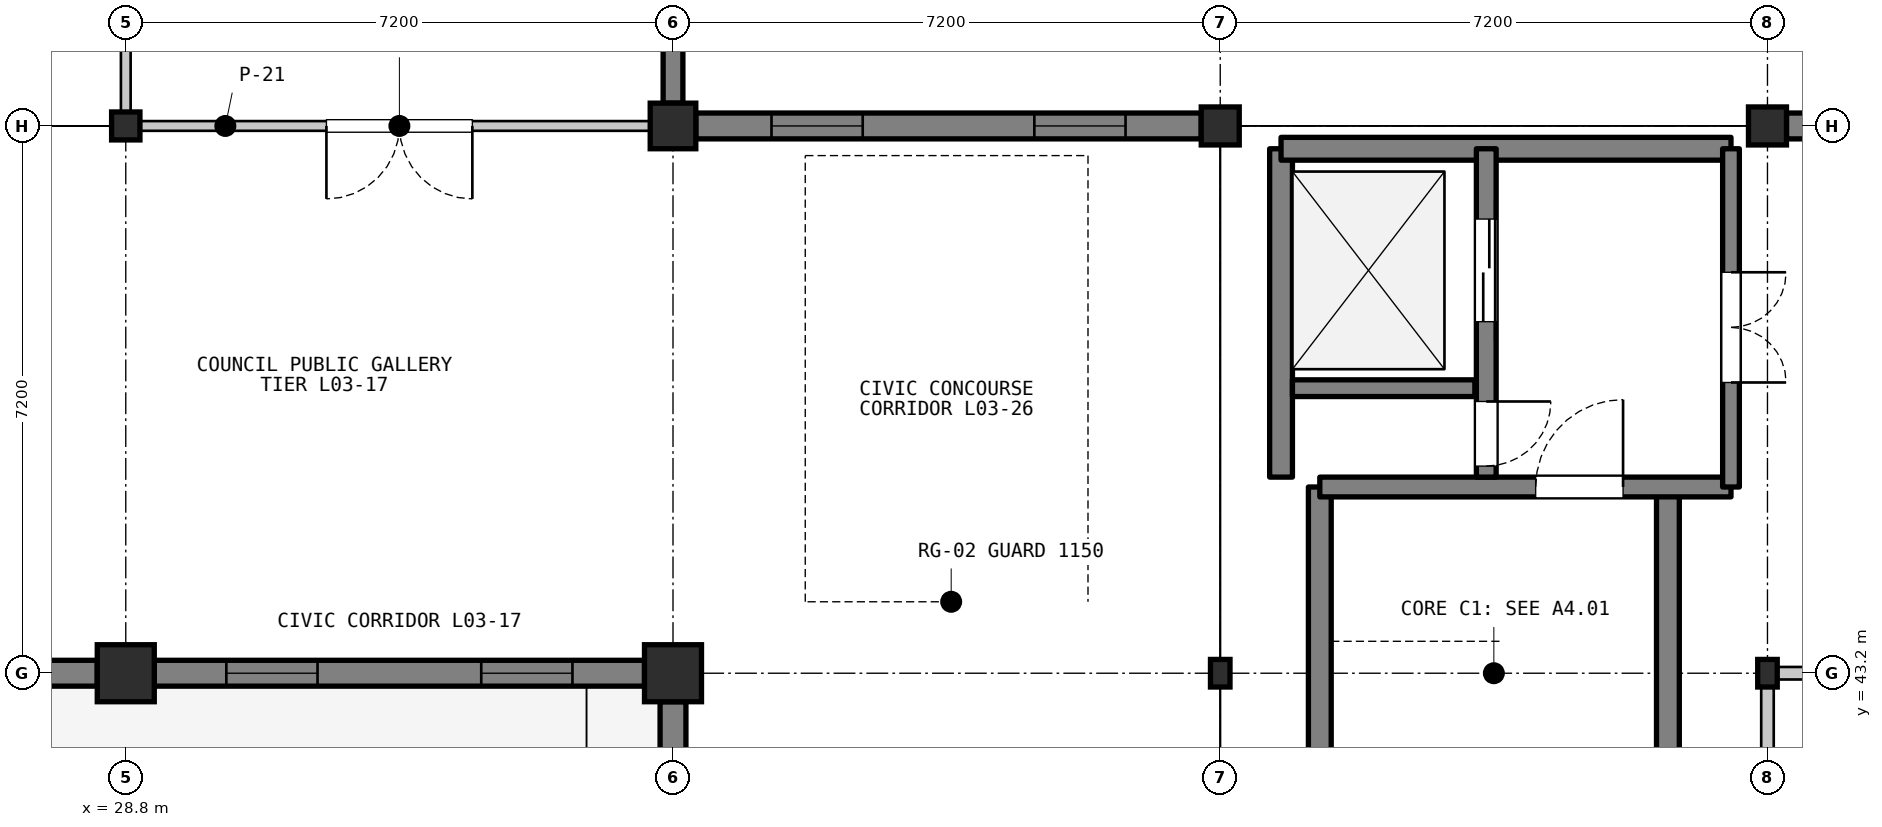
"""IFC4 building model, lengths in metres.
Left out: names, types, materials, properties, quantities, classifications, styles, units other than length and angle.
Written with IfcOpenShell. Run it as: python <this file> out.ifc"""

import sys

from ifc_helpers import new_model, si_unit, direction, frame, frame_2d, origin, origin_2d, place, context, subcontext, project, spatial, rectangle, i_section, extrude, element, fill, save


model = new_model("IFC4")
c1 = context("Model", 3, precision=1e-05, world=origin(), true_north=direction((0.0, 1.0)))
c2 = subcontext(c1, "Body", "Model", "MODEL_VIEW")
j1 = project(units=[si_unit("LENGTHUNIT", "METRE"), si_unit("PLANEANGLEUNIT", "RADIAN")], contexts=[c1])
p1 = place(None, origin())
s1 = spatial("IfcSite", under=j1, at=p1, CompositionType="ELEMENT")
p2 = place(p1, origin())
s2 = spatial("IfcBuilding", under=s1, at=p2, CompositionType="ELEMENT")
p3 = place(p2, frame((0.0, 0.0, 9.9)))
s3 = spatial("IfcBuildingStorey", under=s2, at=p3, CompositionType="ELEMENT", Elevation=9.9)
p4 = place(p3, frame((28.8, 43.2, 0.0), z_axis=(0.0, 0.0, 1.0), x_axis=(1.0, 0.0, 0.0)))
e1 = element("IfcColumn", 1, at=p4, inside=s3, PredefinedType="COLUMN", context=c2, shape_type="SweptSolid", body=[
    extrude(rectangle(XDim=0.75, YDim=0.75, at=origin_2d()), origin(), (0.0, 0.0, 1.0), 4.2),
])
p5 = place(p3, frame((28.8, 50.4, 0.0), z_axis=(0.0, 0.0, 1.0), x_axis=(1.0, 0.0, 0.0)))
e2 = element("IfcColumn", 2, at=p5, inside=s3, PredefinedType="COLUMN", context=c2, shape_type="SweptSolid", body=[
    extrude(i_section(OverallWidth=0.373, OverallDepth=0.368, WebThickness=0.015, FlangeThickness=0.024, FilletRadius=0.015, at=origin_2d()), origin(), (0.0, 0.0, 1.0), 4.2),
])
p6 = place(p3, frame((36.0, 43.2, 0.0), z_axis=(0.0, 0.0, 1.0), x_axis=(1.0, 0.0, 0.0)))
e3 = element("IfcColumn", 3, at=p6, inside=s3, PredefinedType="COLUMN", context=c2, shape_type="SweptSolid", body=[
    extrude(rectangle(XDim=0.75, YDim=0.75, at=origin_2d()), origin(), (0.0, 0.0, 1.0), 4.2),
])
p7 = place(p3, frame((36.0, 50.4, 0.0), z_axis=(0.0, 0.0, 1.0), x_axis=(1.0, 0.0, 0.0)))
e4 = element("IfcColumn", 4, at=p7, inside=s3, PredefinedType="COLUMN", context=c2, shape_type="SweptSolid", body=[
    extrude(rectangle(XDim=0.6, YDim=0.6, at=origin_2d()), origin(), (0.0, 0.0, 1.0), 4.2),
])
p8 = place(p3, frame((43.2, 43.2, 0.0), z_axis=(0.0, 0.0, 1.0), x_axis=(1.0, 0.0, 0.0)))
e5 = element("IfcColumn", 5, at=p8, inside=s3, PredefinedType="COLUMN", context=c2, shape_type="SweptSolid", body=[
    extrude(i_section(OverallWidth=0.257, OverallDepth=0.363, WebThickness=0.013, FlangeThickness=0.022, FilletRadius=0.015, at=origin_2d()), origin(), (0.0, 0.0, 1.0), 4.2),
])
p9 = place(p3, frame((43.2, 50.4, 0.0), z_axis=(0.0, 0.0, 1.0), x_axis=(1.0, 0.0, 0.0)))
e6 = element("IfcColumn", 6, at=p9, inside=s3, PredefinedType="COLUMN", context=c2, shape_type="SweptSolid", body=[
    extrude(rectangle(XDim=0.5, YDim=0.5, at=origin_2d()), origin(), (0.0, 0.0, 1.0), 4.2),
])
p10 = place(p3, frame((50.4, 43.2, 0.0), z_axis=(0.0, 0.0, 1.0), x_axis=(1.0, 0.0, 0.0)))
e7 = element("IfcColumn", 7, at=p10, inside=s3, PredefinedType="COLUMN", context=c2, shape_type="SweptSolid", body=[
    extrude(i_section(OverallWidth=0.257, OverallDepth=0.363, WebThickness=0.013, FlangeThickness=0.022, FilletRadius=0.015, at=origin_2d()), origin(), (0.0, 0.0, 1.0), 4.2),
])
p11 = place(p3, frame((50.4, 50.4, 0.0), z_axis=(0.0, 0.0, 1.0), x_axis=(1.0, 0.0, 0.0)))
e8 = element("IfcColumn", 8, at=p11, inside=s3, PredefinedType="COLUMN", context=c2, shape_type="SweptSolid", body=[
    extrude(rectangle(XDim=0.5, YDim=0.5, at=origin_2d()), origin(), (0.0, 0.0, 1.0), 4.2),
])
p12 = place(p3, frame((28.425, 43.2, 0.0), z_axis=(0.0, 0.0, 1.0), x_axis=(-1.0, 0.0, 0.0)))
e9 = element("IfcWall", 9, at=p12, inside=s3, PredefinedType="SOLIDWALL", context=c2, shape_type="SweptSolid", body=[
    extrude(rectangle(XDim=6.45, YDim=0.34, at=frame_2d((3.225, 0.0))), origin(), (0.0, 0.0, 1.0), 3.398),
])
p13 = place(p12, frame((0.948, 0.0, 0.95)))
e10 = element("IfcOpeningElement", 10, at=p13, cuts=e9, PredefinedType="OPENING", context=c2, shape_type="SweptSolid", body=[
    extrude(rectangle(XDim=1.2, YDim=1.7, at=frame_2d((0.6, 0.85))), frame((0.0, 0.18, 0.0), z_axis=(0.0, -1.0, 0.0), x_axis=(1.0, 0.0, 0.0)), (0.0, 0.0, 1.0), 0.36),
])
p14 = place(p12, frame((4.302, 0.0, 0.95)))
e11 = element("IfcOpeningElement", 11, at=p14, cuts=e9, PredefinedType="OPENING", context=c2, shape_type="SweptSolid", body=[
    extrude(rectangle(XDim=1.2, YDim=1.7, at=frame_2d((0.6, 0.85))), frame((0.0, 0.18, 0.0), z_axis=(0.0, -1.0, 0.0), x_axis=(1.0, 0.0, 0.0)), (0.0, 0.0, 1.0), 0.36),
])
p15 = place(p3, frame((35.625, 43.2, 0.0), z_axis=(0.0, 0.0, 1.0), x_axis=(-1.0, 0.0, 0.0)))
e12 = element("IfcWall", 12, at=p15, inside=s3, PredefinedType="SOLIDWALL", context=c2, shape_type="SweptSolid", body=[
    extrude(rectangle(XDim=6.45, YDim=0.34, at=frame_2d((3.225, 0.0))), origin(), (0.0, 0.0, 1.0), 3.398),
])
p16 = place(p15, frame((0.948, 0.0, 0.95)))
e13 = element("IfcOpeningElement", 13, at=p16, cuts=e12, PredefinedType="OPENING", context=c2, shape_type="SweptSolid", body=[
    extrude(rectangle(XDim=1.2, YDim=1.7, at=frame_2d((0.6, 0.85))), frame((0.0, 0.18, 0.0), z_axis=(0.0, -1.0, 0.0), x_axis=(1.0, 0.0, 0.0)), (0.0, 0.0, 1.0), 0.36),
])
p17 = place(p15, frame((4.302, 0.0, 0.95)))
e14 = element("IfcOpeningElement", 14, at=p17, cuts=e12, PredefinedType="OPENING", context=c2, shape_type="SweptSolid", body=[
    extrude(rectangle(XDim=1.2, YDim=1.7, at=frame_2d((0.6, 0.85))), frame((0.0, 0.18, 0.0), z_axis=(0.0, -1.0, 0.0), x_axis=(1.0, 0.0, 0.0)), (0.0, 0.0, 1.0), 0.36),
])
p18 = place(p3, frame((36.0, 57.3, 0.0), z_axis=(0.0, 0.0, 1.0), x_axis=(0.0, -1.0, 0.0)))
e15 = element("IfcWall", 15, at=p18, inside=s3, PredefinedType="SOLIDWALL", context=c2, shape_type="SweptSolid", body=[
    extrude(rectangle(XDim=6.6, YDim=0.26, at=frame_2d((3.3, 0.0))), origin(), (0.0, 0.0, 1.0), 3.487),
])
p19 = place(p18, frame((1.95, 0.0, 0.95)))
e16 = element("IfcOpeningElement", 16, at=p19, cuts=e15, PredefinedType="OPENING", context=c2, shape_type="SweptSolid", body=[
    extrude(rectangle(XDim=2.7, YDim=1.8, at=frame_2d((1.35, 0.9))), frame((0.0, 0.14, 0.0), z_axis=(0.0, -1.0, 0.0), x_axis=(1.0, 0.0, 0.0)), (0.0, 0.0, 1.0), 0.28),
])
p20 = place(p3, frame((36.0, 36.375, 0.0), z_axis=(0.0, 0.0, 1.0), x_axis=(0.0, 1.0, 0.0)))
e17 = element("IfcWall", 17, at=p20, inside=s3, PredefinedType="SOLIDWALL", context=c2, shape_type="SweptSolid", body=[
    extrude(rectangle(XDim=6.45, YDim=0.34, at=frame_2d((3.225, 0.0))), origin(), (0.0, 0.0, 1.0), 3.35),
])
p21 = place(p20, frame((0.948, 0.0, 0.95)))
e18 = element("IfcOpeningElement", 18, at=p21, cuts=e17, PredefinedType="OPENING", context=c2, shape_type="SweptSolid", body=[
    extrude(rectangle(XDim=1.2, YDim=1.7, at=frame_2d((0.6, 0.85))), frame((0.0, 0.18, 0.0), z_axis=(0.0, -1.0, 0.0), x_axis=(1.0, 0.0, 0.0)), (0.0, 0.0, 1.0), 0.36),
])
p22 = place(p20, frame((4.302, 0.0, 0.95)))
e19 = element("IfcOpeningElement", 19, at=p22, cuts=e17, PredefinedType="OPENING", context=c2, shape_type="SweptSolid", body=[
    extrude(rectangle(XDim=1.2, YDim=1.7, at=frame_2d((0.6, 0.85))), frame((0.0, 0.18, 0.0), z_axis=(0.0, -1.0, 0.0), x_axis=(1.0, 0.0, 0.0)), (0.0, 0.0, 1.0), 0.36),
])
p23 = place(p3, frame((36.3, 50.4, 0.0), z_axis=(0.0, 0.0, 1.0), x_axis=(1.0, 0.0, 0.0)))
e20 = element("IfcWall", 20, at=p23, inside=s3, PredefinedType="SOLIDWALL", context=c2, shape_type="SweptSolid", body=[
    extrude(rectangle(XDim=6.65, YDim=0.34, at=frame_2d((3.325, 0.0))), origin(), (0.0, 0.0, 1.0), 3.398),
])
p24 = place(p23, frame((0.996, 0.0, 0.95)))
e21 = element("IfcOpeningElement", 21, at=p24, cuts=e20, PredefinedType="OPENING", context=c2, shape_type="SweptSolid", body=[
    extrude(rectangle(XDim=1.2, YDim=1.7, at=frame_2d((0.6, 0.85))), frame((0.0, 0.18, 0.0), z_axis=(0.0, -1.0, 0.0), x_axis=(1.0, 0.0, 0.0)), (0.0, 0.0, 1.0), 0.36),
])
p25 = place(p23, frame((4.454, 0.0, 0.95)))
e22 = element("IfcOpeningElement", 22, at=p25, cuts=e20, PredefinedType="OPENING", context=c2, shape_type="SweptSolid", body=[
    extrude(rectangle(XDim=1.2, YDim=1.7, at=frame_2d((0.6, 0.85))), frame((0.0, 0.18, 0.0), z_axis=(0.0, -1.0, 0.0), x_axis=(1.0, 0.0, 0.0)), (0.0, 0.0, 1.0), 0.36),
])
p26 = place(p3, frame((50.65, 50.4, 0.0), z_axis=(0.0, 0.0, 1.0), x_axis=(1.0, 0.0, 0.0)))
e23 = element("IfcWall", 23, at=p26, inside=s3, PredefinedType="SOLIDWALL", context=c2, shape_type="SweptSolid", body=[
    extrude(rectangle(XDim=6.7, YDim=0.34, at=frame_2d((3.35, 0.0))), origin(), (0.0, 0.0, 1.0), 3.398),
])
p27 = place(p26, frame((1.008, 0.0, 0.95)))
e24 = element("IfcOpeningElement", 24, at=p27, cuts=e23, PredefinedType="OPENING", context=c2, shape_type="SweptSolid", body=[
    extrude(rectangle(XDim=1.2, YDim=1.7, at=frame_2d((0.6, 0.85))), frame((0.0, 0.18, 0.0), z_axis=(0.0, -1.0, 0.0), x_axis=(1.0, 0.0, 0.0)), (0.0, 0.0, 1.0), 0.36),
])
p28 = place(p26, frame((4.492, 0.0, 0.95)))
e25 = element("IfcOpeningElement", 25, at=p28, cuts=e23, PredefinedType="OPENING", context=c2, shape_type="SweptSolid", body=[
    extrude(rectangle(XDim=1.2, YDim=1.7, at=frame_2d((0.6, 0.85))), frame((0.0, 0.18, 0.0), z_axis=(0.0, -1.0, 0.0), x_axis=(1.0, 0.0, 0.0)), (0.0, 0.0, 1.0), 0.36),
])
for number, where, z_axis, x_axis in (
    (26, (44.51, 36.35, 0.0), (0.0, 0.0, 1.0), (0.0, 1.0, 0.0)),
    (27, (49.09, 36.35, 0.0), (0.0, 0.0, 1.0), (0.0, 1.0, 0.0)),
):
    element("IfcWall", number, at=place(p3, frame(where, z_axis=z_axis, x_axis=x_axis)), inside=s3, PredefinedType="SHEAR", context=c2, shape_type="SweptSolid", body=[
        extrude(rectangle(XDim=9.3, YDim=0.3, at=frame_2d((4.65, 0.0))), origin(), (0.0, 0.0, 1.0), 4.02),
    ])
p29 = place(p3, frame((44.51, 45.65, 0.0), z_axis=(0.0, 0.0, 1.0), x_axis=(1.0, 0.0, 0.0)))
e28 = element("IfcWall", 28, at=p29, inside=s3, PredefinedType="SHEAR", context=c2, shape_type="SweptSolid", body=[
    extrude(rectangle(XDim=5.41, YDim=0.26, at=frame_2d((2.705, 0.0))), origin(), (0.0, 0.0, 1.0), 4.02),
])
p30 = place(p29, frame((2.84, 0.0, 0.0)))
e29 = element("IfcOpeningElement", 29, at=p30, cuts=e28, PredefinedType="OPENING", context=c2, shape_type="SweptSolid", body=[
    extrude(rectangle(XDim=1.15, YDim=2.15, at=frame_2d((0.575, 1.075))), frame((0.0, 0.14, 0.0), z_axis=(0.0, -1.0, 0.0), x_axis=(1.0, 0.0, 0.0)), (0.0, 0.0, 1.0), 0.28),
])
p31 = place(p3, frame((44.0, 45.78, 0.0), z_axis=(0.0, 0.0, 1.0), x_axis=(0.0, 1.0, 0.0)))
e30 = element("IfcWall", 30, at=p31, inside=s3, PredefinedType="SHEAR", context=c2, shape_type="SweptSolid", body=[
    extrude(rectangle(XDim=4.32, YDim=0.3, at=frame_2d((2.16, 0.0))), origin(), (0.0, 0.0, 1.0), 4.02),
])
p32 = place(p3, frame((44.0, 50.1, 0.0), z_axis=(0.0, 0.0, 1.0), x_axis=(1.0, 0.0, 0.0)))
e31 = element("IfcWall", 31, at=p32, inside=s3, PredefinedType="SHEAR", context=c2, shape_type="SweptSolid", body=[
    extrude(rectangle(XDim=5.92, YDim=0.3, at=frame_2d((2.96, 0.0))), origin(), (0.0, 0.0, 1.0), 4.02),
])
p33 = place(p3, frame((44.15, 46.95, 0.0), z_axis=(0.0, 0.0, 1.0), x_axis=(1.0, 0.0, 0.0)))
e32 = element("IfcWall", 32, at=p33, inside=s3, PredefinedType="SHEAR", context=c2, shape_type="SweptSolid", body=[
    extrude(rectangle(XDim=2.4, YDim=0.22, at=frame_2d((1.2, 0.0))), origin(), (0.0, 0.0, 1.0), 4.02),
])
p34 = place(p3, frame((46.7, 50.1, 0.0), z_axis=(0.0, 0.0, 1.0), x_axis=(0.0, -1.0, 0.0)))
e33 = element("IfcWall", 33, at=p34, inside=s3, PredefinedType="SHEAR", context=c2, shape_type="SweptSolid", body=[
    extrude(rectangle(XDim=4.32, YDim=0.26, at=frame_2d((2.16, 0.0))), origin(), (0.0, 0.0, 1.0), 4.02),
])
p35 = place(p34, frame((0.925, 0.0, 0.0)))
e34 = element("IfcOpeningElement", 34, at=p35, cuts=e33, PredefinedType="OPENING", context=c2, shape_type="SweptSolid", body=[
    extrude(rectangle(XDim=1.35, YDim=2.2, at=frame_2d((0.675, 1.1))), frame((0.0, 0.14, 0.0), z_axis=(0.0, -1.0, 0.0), x_axis=(1.0, 0.0, 0.0)), (0.0, 0.0, 1.0), 0.28),
])
p36 = place(p34, frame((3.325, 0.0, 0.0)))
e35 = element("IfcOpeningElement", 35, at=p36, cuts=e33, PredefinedType="OPENING", context=c2, shape_type="SweptSolid", body=[
    extrude(rectangle(XDim=0.85, YDim=2.05, at=frame_2d((0.425, 1.025))), frame((0.0, 0.14, 0.0), z_axis=(0.0, -1.0, 0.0), x_axis=(1.0, 0.0, 0.0)), (0.0, 0.0, 1.0), 0.28),
])
p37 = place(p3, frame((49.92, 50.1, 0.0), z_axis=(0.0, 0.0, 1.0), x_axis=(0.0, -1.0, 0.0)))
e36 = element("IfcWall", 36, at=p37, inside=s3, PredefinedType="SHEAR", context=c2, shape_type="SweptSolid", body=[
    extrude(rectangle(XDim=4.45, YDim=0.22, at=frame_2d((2.225, 0.0))), origin(), (0.0, 0.0, 1.0), 4.02),
])
p38 = place(p37, frame((1.625, 0.0, 0.0)))
e37 = element("IfcOpeningElement", 37, at=p38, cuts=e36, PredefinedType="OPENING", context=c2, shape_type="SweptSolid", body=[
    extrude(rectangle(XDim=1.45, YDim=2.2, at=frame_2d((0.725, 1.1))), frame((0.0, 0.12, 0.0), z_axis=(0.0, -1.0, 0.0), x_axis=(1.0, 0.0, 0.0)), (0.0, 0.0, 1.0), 0.24),
])
p39 = place(p3, frame((35.88, 50.4, 0.0), z_axis=(0.0, 0.0, 1.0), x_axis=(-1.0, 0.0, 0.0)))
e38 = element("IfcWall", 38, at=p39, inside=s3, PredefinedType="PARTITIONING", context=c2, shape_type="SweptSolid", body=[
    extrude(rectangle(XDim=6.96, YDim=0.128, at=frame_2d((3.48, 0.0))), origin(), (0.0, 0.0, 1.0), 3.388),
])
p40 = place(p39, frame((2.52, 0.0, 0.0)))
e39 = element("IfcOpeningElement", 39, at=p40, cuts=e38, PredefinedType="OPENING", context=c2, shape_type="SweptSolid", body=[
    extrude(rectangle(XDim=1.92, YDim=2.38, at=frame_2d((0.96, 1.19))), frame((0.0, 0.074, 0.0), z_axis=(0.0, -1.0, 0.0), x_axis=(1.0, 0.0, 0.0)), (0.0, 0.0, 1.0), 0.148),
])
p41 = place(p3, frame((28.8, 50.52, 0.0), z_axis=(0.0, 0.0, 1.0), x_axis=(0.0, 1.0, 0.0)))
e40 = element("IfcWall", 40, at=p41, inside=s3, PredefinedType="PARTITIONING", context=c2, shape_type="SweptSolid", body=[
    extrude(rectangle(XDim=6.8, YDim=0.128, at=frame_2d((3.4, 0.0))), origin(), (0.0, 0.0, 1.0), 3.388),
])
p42 = place(p3, frame((50.52, 43.2, 0.0), z_axis=(0.0, 0.0, 1.0), x_axis=(1.0, 0.0, 0.0)))
e41 = element("IfcWall", 41, at=p42, inside=s3, PredefinedType="PARTITIONING", context=c2, shape_type="SweptSolid", body=[
    extrude(rectangle(XDim=6.8, YDim=0.165, at=frame_2d((3.4, 0.0))), origin(), (0.0, 0.0, 1.0), 3.388),
])
p43 = place(p42, frame((2.64, 0.0, 0.0)))
e42 = element("IfcOpeningElement", 42, at=p43, cuts=e41, PredefinedType="OPENING", context=c2, shape_type="SweptSolid", body=[
    extrude(rectangle(XDim=1.52, YDim=2.4, at=frame_2d((0.76, 1.2))), frame((0.0, 0.093, 0.0), z_axis=(0.0, -1.0, 0.0), x_axis=(1.0, 0.0, 0.0)), (0.0, 0.0, 1.0), 0.185),
])
p44 = place(p42, frame((0.45, 0.0, 1.05)))
e43 = element("IfcOpeningElement", 43, at=p44, cuts=e41, PredefinedType="OPENING", context=c2, shape_type="SweptSolid", body=[
    extrude(rectangle(XDim=1.55, YDim=1.15, at=frame_2d((0.775, 0.575))), frame((0.0, 0.093, 0.0), z_axis=(0.0, -1.0, 0.0), x_axis=(1.0, 0.0, 0.0)), (0.0, 0.0, 1.0), 0.185),
])
p45 = place(p3, frame((50.4, 36.12, 0.0), z_axis=(0.0, 0.0, 1.0), x_axis=(0.0, 1.0, 0.0)))
e44 = element("IfcWall", 44, at=p45, inside=s3, PredefinedType="PARTITIONING", context=c2, shape_type="SweptSolid", body=[
    extrude(rectangle(XDim=6.96, YDim=0.165, at=frame_2d((3.48, 0.0))), origin(), (0.0, 0.0, 1.0), 3.388),
])
p46 = place(p16, origin())
e45 = element("IfcWindow", 45, at=p46, inside=s3, PartitioningType="SINGLE_PANEL", PredefinedType="WINDOW", context=c2, shape_type="SweptSolid", body=[
    extrude(rectangle(XDim=1.2, YDim=1.7, at=frame_2d((0.6, 0.85))), frame((0.0, 0.03, 0.0), z_axis=(0.0, -1.0, 0.0), x_axis=(1.0, 0.0, 0.0)), (0.0, 0.0, 1.0), 0.06),
])
fill(e13, e45)
p47 = place(p17, origin())
e46 = element("IfcWindow", 46, at=p47, inside=s3, PartitioningType="SINGLE_PANEL", PredefinedType="WINDOW", context=c2, shape_type="SweptSolid", body=[
    extrude(rectangle(XDim=1.2, YDim=1.7, at=frame_2d((0.6, 0.85))), frame((0.0, 0.03, 0.0), z_axis=(0.0, -1.0, 0.0), x_axis=(1.0, 0.0, 0.0)), (0.0, 0.0, 1.0), 0.06),
])
fill(e14, e46)
p48 = place(p24, origin())
e47 = element("IfcWindow", 47, at=p48, inside=s3, PartitioningType="SINGLE_PANEL", PredefinedType="WINDOW", context=c2, shape_type="SweptSolid", body=[
    extrude(rectangle(XDim=1.2, YDim=1.7, at=frame_2d((0.6, 0.85))), frame((0.0, 0.03, 0.0), z_axis=(0.0, -1.0, 0.0), x_axis=(1.0, 0.0, 0.0)), (0.0, 0.0, 1.0), 0.06),
])
fill(e21, e47)
p49 = place(p25, origin())
e48 = element("IfcWindow", 48, at=p49, inside=s3, PartitioningType="SINGLE_PANEL", PredefinedType="WINDOW", context=c2, shape_type="SweptSolid", body=[
    extrude(rectangle(XDim=1.2, YDim=1.7, at=frame_2d((0.6, 0.85))), frame((0.0, 0.03, 0.0), z_axis=(0.0, -1.0, 0.0), x_axis=(1.0, 0.0, 0.0)), (0.0, 0.0, 1.0), 0.06),
])
fill(e22, e48)
p50 = place(p30, origin())
e49 = element("IfcDoor", 49, at=p50, inside=s3, OperationType="SINGLE_SWING_RIGHT", PredefinedType="DOOR", context=c2, shape_type="SweptSolid", body=[
    extrude(rectangle(XDim=1.15, YDim=2.15, at=frame_2d((0.575, 1.075))), frame((0.0, 0.025, 0.0), z_axis=(0.0, -1.0, 0.0), x_axis=(1.0, 0.0, 0.0)), (0.0, 0.0, 1.0), 0.05),
])
fill(e29, e49)
p51 = place(p35, origin())
e50 = element("IfcDoor", 50, at=p51, inside=s3, OperationType="DOUBLE_DOOR_SLIDING", PredefinedType="DOOR", context=c2, shape_type="SweptSolid", body=[
    extrude(rectangle(XDim=1.35, YDim=2.2, at=frame_2d((0.675, 1.1))), frame((0.0, 0.025, 0.0), z_axis=(0.0, -1.0, 0.0), x_axis=(1.0, 0.0, 0.0)), (0.0, 0.0, 1.0), 0.05),
])
fill(e34, e50)
p52 = place(p36, origin())
e51 = element("IfcDoor", 51, at=p52, inside=s3, OperationType="SINGLE_SWING_LEFT", PredefinedType="DOOR", context=c2, shape_type="SweptSolid", body=[
    extrude(rectangle(XDim=0.85, YDim=2.05, at=frame_2d((0.425, 1.025))), frame((0.0, 0.025, 0.0), z_axis=(0.0, -1.0, 0.0), x_axis=(1.0, 0.0, 0.0)), (0.0, 0.0, 1.0), 0.05),
])
fill(e35, e51)
p53 = place(p38, origin())
e52 = element("IfcDoor", 52, at=p53, inside=s3, OperationType="DOUBLE_DOOR_SINGLE_SWING", PredefinedType="DOOR", context=c2, shape_type="SweptSolid", body=[
    extrude(rectangle(XDim=1.45, YDim=2.2, at=frame_2d((0.725, 1.1))), frame((0.0, 0.025, 0.0), z_axis=(0.0, -1.0, 0.0), x_axis=(1.0, 0.0, 0.0)), (0.0, 0.0, 1.0), 0.05),
])
fill(e37, e52)
p54 = place(p40, origin())
e53 = element("IfcDoor", 53, at=p54, inside=s3, OperationType="DOUBLE_DOOR_SINGLE_SWING", PredefinedType="DOOR", context=c2, shape_type="SweptSolid", body=[
    extrude(rectangle(XDim=1.92, YDim=2.38, at=frame_2d((0.96, 1.19))), frame((0.0, 0.025, 0.0), z_axis=(0.0, -1.0, 0.0), x_axis=(1.0, 0.0, 0.0)), (0.0, 0.0, 1.0), 0.05),
])
fill(e39, e53)
save(model, sys.argv[1])
